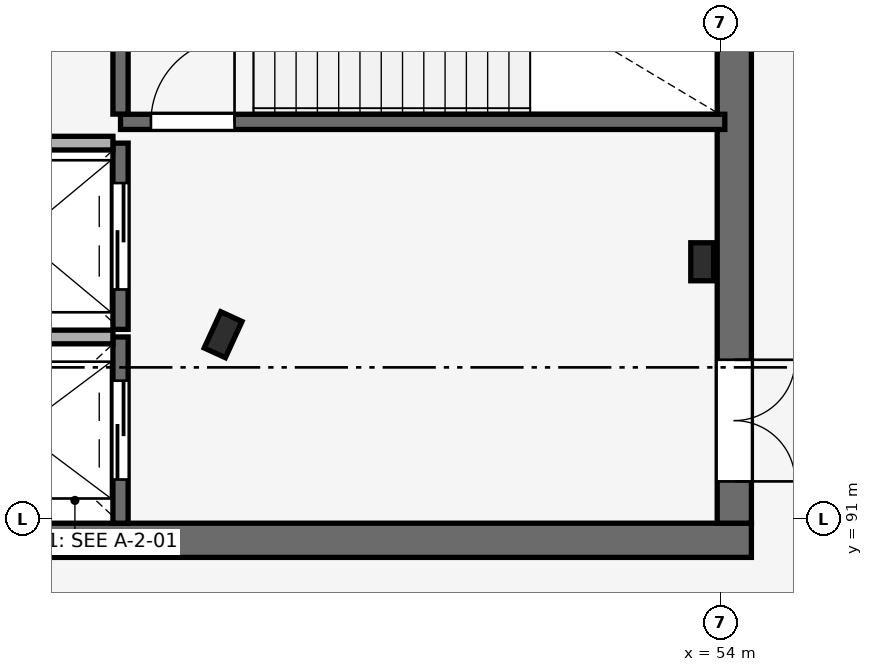
"""IFC4 building model, lengths in metres.
Left out: names, types, materials, properties, quantities, classifications, styles, units other than length and angle.
Written with IfcOpenShell. Run it as: python <this file> out.ifc"""

import sys

from ifc_helpers import new_model, si_unit, direction, frame, frame_2d, origin, origin_2d, place, context, subcontext, project, spatial, rectangle, i_section, extrude, element, fill, save


model = new_model("IFC4")
c1 = context("Model", 3, precision=1e-05, world=origin(), true_north=direction((0.0, 1.0)))
c2 = subcontext(c1, "Body", "Model", "MODEL_VIEW")
j1 = project(units=[si_unit("LENGTHUNIT", "METRE"), si_unit("PLANEANGLEUNIT", "RADIAN")], contexts=[c1])
p1 = place(None, origin())
s1 = spatial("IfcSite", under=j1, at=p1, CompositionType="ELEMENT")
p2 = place(p1, origin())
s2 = spatial("IfcBuilding", under=s1, at=p2, CompositionType="ELEMENT")
p3 = place(p2, frame((0.0, 0.0, 10.2)))
s3 = spatial("IfcBuildingStorey", under=s2, at=p3, CompositionType="ELEMENT", Elevation=10.2)
p4 = place(p3, frame((47.45, 93.43, 0.0), z_axis=(0.0, 0.0, 1.0), x_axis=(-0.909018020308, 0.416756810089, 0.0)))
e1 = element("IfcColumn", 1, at=p4, inside=s3, PredefinedType="COLUMN", context=c2, shape_type="SweptSolid", body=[
    extrude(i_section(OverallWidth=0.306, OverallDepth=0.524, WebThickness=0.021, FlangeThickness=0.04, FilletRadius=0.027, at=origin_2d()), origin(), (0.0, 0.0, 1.0), 4.8),
])
p5 = place(p3, frame((43.0, 90.725, 0.0), z_axis=(0.0, 0.0, 1.0), x_axis=(1.0, 0.0, 0.0)))
e2 = element("IfcWall", 2, at=p5, inside=s3, PredefinedType="SHEAR", context=c2, shape_type="SweptSolid", body=[
    extrude(rectangle(XDim=11.4, YDim=0.45, at=frame_2d((5.7, 0.0))), origin(), (0.0, 0.0, 1.0), 4.8),
])
p6 = place(p3, frame((54.175, 90.95, 0.0), z_axis=(0.0, 0.0, 1.0), x_axis=(0.0, 1.0, 0.0)))
e3 = element("IfcWall", 3, at=p6, inside=s3, PredefinedType="SHEAR", context=c2, shape_type="SweptSolid", body=[
    extrude(rectangle(XDim=9.1, YDim=0.45, at=frame_2d((4.55, 0.0))), origin(), (0.0, 0.0, 1.0), 4.8),
])
p7 = place(p6, frame((0.55, 0.0, 0.0)))
e4 = element("IfcOpeningElement", 4, at=p7, cuts=e3, PredefinedType="OPENING", context=c2, shape_type="SweptSolid", body=[
    extrude(rectangle(XDim=1.6, YDim=2.2, at=frame_2d((0.8, 1.1))), frame((0.0, 0.235, 0.0), z_axis=(0.0, -1.0, 0.0), x_axis=(1.0, 0.0, 0.0)), (0.0, 0.0, 1.0), 0.47),
])
p8 = place(p3, frame((53.752, 94.389, 0.0), z_axis=(0.0, 0.0, 1.0), x_axis=(1.0, 0.0, 0.0)))
e5 = element("IfcColumn", 5, at=p8, inside=s3, PredefinedType="COLUMN", context=c2, shape_type="SweptSolid", body=[
    extrude(i_section(OverallWidth=0.3, OverallDepth=0.5, WebThickness=0.014, FlangeThickness=0.028, FilletRadius=0.027, at=origin_2d()), origin(), (0.0, 0.0, 1.0), 4.8),
])
p9 = place(p3, frame((46.1, 90.95, 0.0), z_axis=(0.0, 0.0, 1.0), x_axis=(0.0, 1.0, 0.0)))
e6 = element("IfcWall", 6, at=p9, inside=s3, PredefinedType="SHEAR", context=c2, shape_type="SweptSolid", body=[
    extrude(rectangle(XDim=2.45, YDim=0.2, at=frame_2d((1.225, 0.0))), origin(), (0.0, 0.0, 1.0), 4.52),
])
p10 = place(p9, frame((0.575, 0.0, 0.0)))
e7 = element("IfcOpeningElement", 7, at=p10, cuts=e6, PredefinedType="OPENING", context=c2, shape_type="SweptSolid", body=[
    extrude(rectangle(XDim=1.3, YDim=2.2, at=frame_2d((0.65, 1.1))), frame((0.0, 0.11, 0.0), z_axis=(0.0, -1.0, 0.0), x_axis=(1.0, 0.0, 0.0)), (0.0, 0.0, 1.0), 0.22),
])
p11 = place(p3, frame((43.55, 93.4, 0.0), z_axis=(0.0, 0.0, 1.0), x_axis=(1.0, 0.0, 0.0)))
e8 = element("IfcWall", 8, at=p11, inside=s3, PredefinedType="PARTITIONING", context=c2, shape_type="SweptSolid", body=[
    extrude(rectangle(XDim=2.45, YDim=0.18, at=frame_2d((1.225, 0.0))), origin(), (0.0, 0.0, 1.0), 4.8),
])
p12 = place(p3, frame((46.1, 93.5, 0.0), z_axis=(0.0, 0.0, 1.0), x_axis=(0.0, 1.0, 0.0)))
e9 = element("IfcWall", 9, at=p12, inside=s3, PredefinedType="SHEAR", context=c2, shape_type="SweptSolid", body=[
    extrude(rectangle(XDim=2.45, YDim=0.2, at=frame_2d((1.225, 0.0))), origin(), (0.0, 0.0, 1.0), 4.52),
])
p13 = place(p12, frame((0.525, 0.0, 0.0)))
e10 = element("IfcOpeningElement", 10, at=p13, cuts=e9, PredefinedType="OPENING", context=c2, shape_type="SweptSolid", body=[
    extrude(rectangle(XDim=1.4, YDim=2.2, at=frame_2d((0.7, 1.1))), frame((0.0, 0.11, 0.0), z_axis=(0.0, -1.0, 0.0), x_axis=(1.0, 0.0, 0.0)), (0.0, 0.0, 1.0), 0.22),
])
p14 = place(p3, frame((43.55, 95.95, 0.0), z_axis=(0.0, 0.0, 1.0), x_axis=(1.0, 0.0, 0.0)))
e11 = element("IfcWall", 11, at=p14, inside=s3, PredefinedType="PARTITIONING", context=c2, shape_type="SweptSolid", body=[
    extrude(rectangle(XDim=2.45, YDim=0.18, at=frame_2d((1.225, 0.0))), origin(), (0.0, 0.0, 1.0), 4.8),
])
p15 = place(p3, frame((46.1, 96.23, 0.0), z_axis=(0.0, 0.0, 1.0), x_axis=(1.0, 0.0, 0.0)))
e12 = element("IfcWall", 12, at=p15, inside=s3, PredefinedType="SHEAR", context=c2, shape_type="SweptSolid", body=[
    extrude(rectangle(XDim=7.95, YDim=0.2, at=frame_2d((3.975, 0.0))), origin(), (0.0, 0.0, 1.0), 4.8),
])
p16 = place(p15, frame((0.4, 0.0, 0.0)))
e13 = element("IfcOpeningElement", 13, at=p16, cuts=e12, PredefinedType="OPENING", context=c2, shape_type="SweptSolid", body=[
    extrude(rectangle(XDim=1.1, YDim=2.15, at=frame_2d((0.55, 1.075))), frame((0.0, 0.11, 0.0), z_axis=(0.0, -1.0, 0.0), x_axis=(1.0, 0.0, 0.0)), (0.0, 0.0, 1.0), 0.22),
])
p17 = place(p3, frame((46.1, 96.332, 0.0), z_axis=(0.0, 0.0, 1.0), x_axis=(0.0, 1.0, 0.0)))
e14 = element("IfcWall", 14, at=p17, inside=s3, PredefinedType="SHEAR", context=c2, shape_type="SweptSolid", body=[
    extrude(rectangle(XDim=3.686, YDim=0.2, at=frame_2d((1.843, 0.0))), origin(), (0.0, 0.0, 1.0), 4.8),
])
p18 = place(p10, origin())
e15 = element("IfcDoor", 15, at=p18, inside=s3, OperationType="DOUBLE_DOOR_SLIDING", PredefinedType="DOOR", context=c2, shape_type="SweptSolid", body=[
    extrude(rectangle(XDim=1.3, YDim=2.2, at=frame_2d((0.65, 1.1))), frame((0.0, 0.025, 0.0), z_axis=(0.0, -1.0, 0.0), x_axis=(1.0, 0.0, 0.0)), (0.0, 0.0, 1.0), 0.05),
])
fill(e7, e15)
p19 = place(p13, origin())
e16 = element("IfcDoor", 16, at=p19, inside=s3, OperationType="DOUBLE_DOOR_SLIDING", PredefinedType="DOOR", context=c2, shape_type="SweptSolid", body=[
    extrude(rectangle(XDim=1.4, YDim=2.2, at=frame_2d((0.7, 1.1))), frame((0.0, 0.025, 0.0), z_axis=(0.0, -1.0, 0.0), x_axis=(1.0, 0.0, 0.0)), (0.0, 0.0, 1.0), 0.05),
])
fill(e10, e16)
p20 = place(p16, frame((1.1, 0.0, 0.0), z_axis=(0.0, 0.0, 1.0), x_axis=(-1.0, 0.0, 0.0)))
e17 = element("IfcDoor", 17, at=p20, inside=s3, OperationType="SINGLE_SWING_LEFT", PredefinedType="DOOR", context=c2, shape_type="SweptSolid", body=[
    extrude(rectangle(XDim=1.1, YDim=2.15, at=frame_2d((0.55, 1.075))), frame((0.0, 0.025, 0.0), z_axis=(0.0, -1.0, 0.0), x_axis=(1.0, 0.0, 0.0)), (0.0, 0.0, 1.0), 0.05),
])
fill(e13, e17)
p21 = place(p7, frame((1.6, 0.0, 0.0), z_axis=(0.0, 0.0, 1.0), x_axis=(-1.0, 0.0, 0.0)))
e18 = element("IfcDoor", 18, at=p21, inside=s3, OperationType="DOUBLE_DOOR_SINGLE_SWING", PredefinedType="DOOR", context=c2, shape_type="SweptSolid", body=[
    extrude(rectangle(XDim=1.6, YDim=2.2, at=frame_2d((0.8, 1.1))), frame((0.0, 0.025, 0.0), z_axis=(0.0, -1.0, 0.0), x_axis=(1.0, 0.0, 0.0)), (0.0, 0.0, 1.0), 0.05),
])
fill(e4, e18)
save(model, sys.argv[1])
